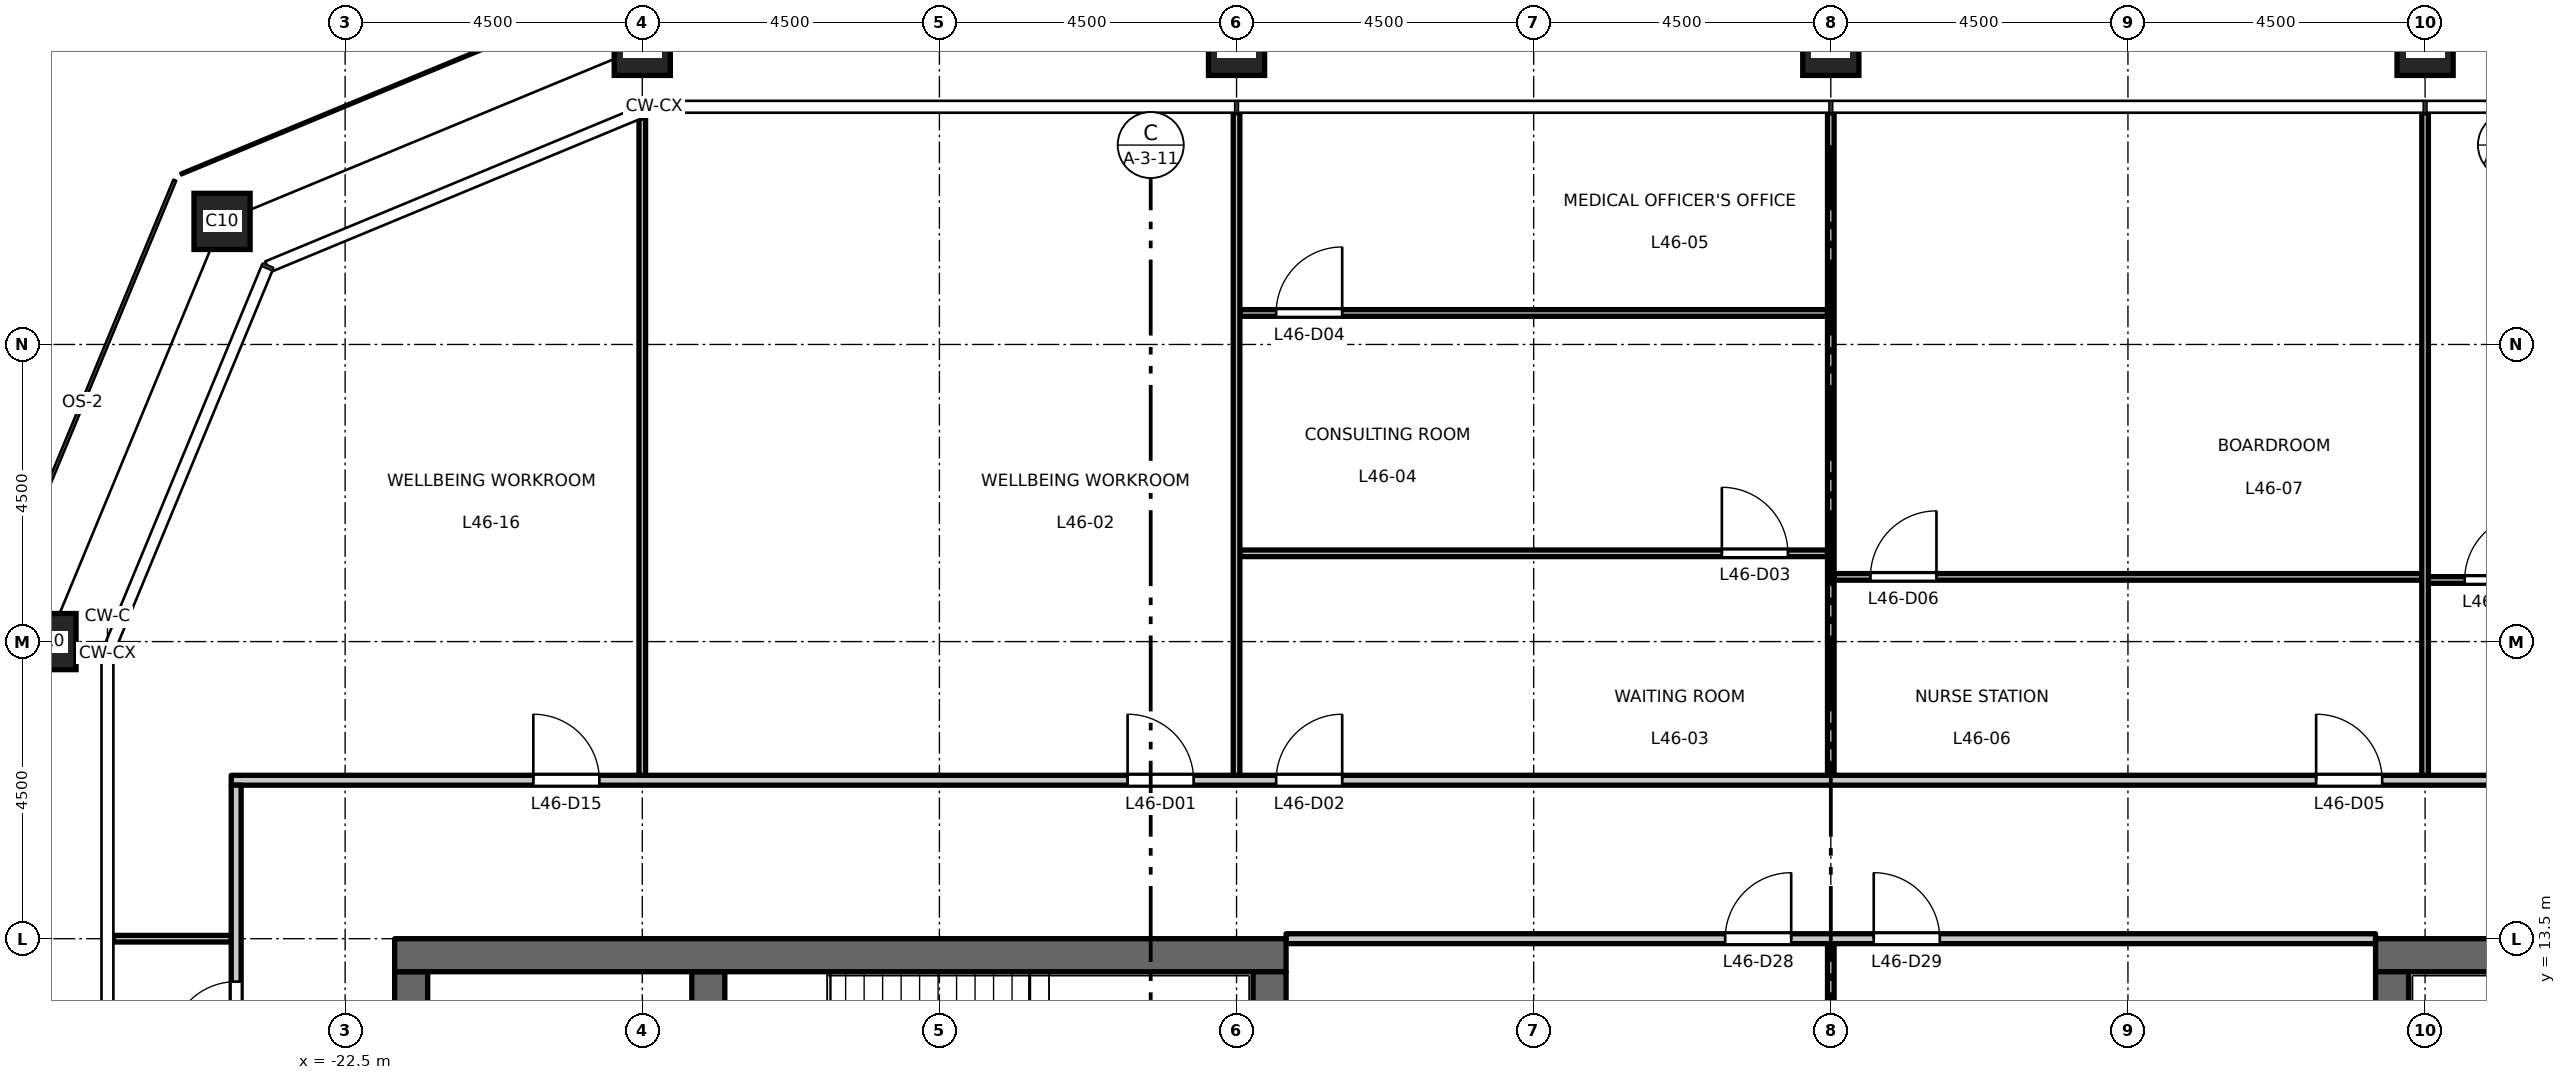
"""IFC4 building model, lengths in metres.
Left out: names, types, materials, properties, quantities, classifications, styles, units other than length and angle.
Written with IfcOpenShell. Run it as: python <this file> out.ifc"""

import sys

from ifc_helpers import new_model, si_unit, direction, frame, frame_2d, origin, origin_2d, place, context, subcontext, project, spatial, rectangle, hollow_rectangle, extrude, element, fill, save


model = new_model("IFC4")
c1 = context("Model", 3, precision=1e-05, world=origin(), true_north=direction((0.0, 1.0)))
c2 = subcontext(c1, "Body", "Model", "MODEL_VIEW")
j1 = project(units=[si_unit("LENGTHUNIT", "METRE"), si_unit("PLANEANGLEUNIT", "RADIAN")], contexts=[c1])
p1 = place(None, origin())
s1 = spatial("IfcSite", under=j1, at=p1, CompositionType="ELEMENT")
p2 = place(p1, origin())
s2 = spatial("IfcBuilding", under=s1, at=p2, CompositionType="ELEMENT")
p3 = place(p2, frame((0.0, 0.0, 215.2)))
s3 = spatial("IfcBuildingStorey", under=s2, at=p3, CompositionType="ELEMENT", Elevation=215.2)
for number, where, z_axis, x_axis in (
    (1, (9.0, 27.0, 0.0), (0.0, 0.0, 1.0), (1.0, 0.0, 0.0)),
    (2, (0.0, 27.0, 0.0), (0.0, 0.0, 1.0), (1.0, 0.0, 0.0)),
    (3, (-9.0, 27.0, 0.0), (0.0, 0.0, 1.0), (1.0, 0.0, 0.0)),
    (4, (-18.0, 27.0, 0.0), (0.0, 0.0, 1.0), (1.0, 0.0, 0.0)),
    (5, (-24.364, 24.364, 0.0), (0.0, 0.0, 1.0), (1.0, 0.0, 0.0)),
    (6, (-27.0, 18.0, 0.0), (0.0, 0.0, 1.0), (1.0, 0.0, 0.0)),
):
    element("IfcColumn", number, at=place(p3, frame(where, z_axis=z_axis, x_axis=x_axis)), inside=s3, PredefinedType="COLUMN", context=c2, shape_type="SweptSolid", body=[
        extrude(hollow_rectangle(XDim=0.85, YDim=0.85, WallThickness=0.05, at=origin_2d()), origin(), (0.0, 0.0, 1.0), 4.5),
    ])
p4 = place(p3, frame((-21.5, -13.0, 0.0), z_axis=(0.0, 0.0, 1.0), x_axis=(0.0, 1.0, 0.0)))
e7 = element("IfcWall", 7, at=p4, inside=s3, PredefinedType="SHEAR", context=c2, shape_type="SweptSolid", body=[
    extrude(rectangle(XDim=26.0, YDim=0.5, at=frame_2d((13.0, 0.0))), origin(), (0.0, 0.0, 1.0), 4.35),
])
p5 = place(p4, frame((16.825, 0.0, 0.0)))
e8 = element("IfcOpeningElement", 8, at=p5, cuts=e7, PredefinedType="OPENING", context=c2, shape_type="SweptSolid", body=[
    extrude(rectangle(XDim=1.8, YDim=2.1, at=frame_2d((0.9, 1.05))), frame((0.0, 0.26, 0.0), z_axis=(0.0, -1.0, 0.0), x_axis=(1.0, 0.0, 0.0)), (0.0, 0.0, 1.0), 0.52),
])
p6 = place(p4, frame((7.375, 0.0, 0.0)))
e9 = element("IfcOpeningElement", 9, at=p6, cuts=e7, PredefinedType="OPENING", context=c2, shape_type="SweptSolid", body=[
    extrude(rectangle(XDim=1.8, YDim=2.1, at=frame_2d((0.9, 1.05))), frame((0.0, 0.26, 0.0), z_axis=(0.0, -1.0, 0.0), x_axis=(1.0, 0.0, 0.0)), (0.0, 0.0, 1.0), 0.52),
])
p7 = place(p4, frame((14.125, 0.0, 0.0)))
e10 = element("IfcOpeningElement", 10, at=p7, cuts=e7, PredefinedType="OPENING", context=c2, shape_type="SweptSolid", body=[
    extrude(rectangle(XDim=0.9, YDim=2.1, at=frame_2d((0.45, 1.05))), frame((0.0, 0.26, 0.0), z_axis=(0.0, -1.0, 0.0), x_axis=(1.0, 0.0, 0.0)), (0.0, 0.0, 1.0), 0.52),
])
p8 = place(p3, frame((-17.0, 6.425, 0.0), z_axis=(0.0, 0.0, 1.0), x_axis=(0.0, 1.0, 0.0)))
e11 = element("IfcWall", 11, at=p8, inside=s3, PredefinedType="SHEAR", context=c2, shape_type="SweptSolid", body=[
    extrude(rectangle(XDim=6.575, YDim=0.5, at=frame_2d((3.288, 0.0))), origin(), (0.0, 0.0, 1.0), 4.35),
])
p9 = place(p3, frame((-8.25, 13.25, 0.0), z_axis=(0.0, 0.0, 1.0), x_axis=(-1.0, 0.0, 0.0)))
e12 = element("IfcWall", 12, at=p9, inside=s3, PredefinedType="SHEAR", context=c2, shape_type="SweptSolid", body=[
    extrude(rectangle(XDim=13.5, YDim=0.5, at=frame_2d((6.75, 0.0))), origin(), (0.0, 0.0, 1.0), 4.35),
])
p10 = place(p3, frame((-8.5, -13.0, 0.0), z_axis=(0.0, 0.0, 1.0), x_axis=(0.0, 1.0, 0.0)))
e13 = element("IfcWall", 13, at=p10, inside=s3, PredefinedType="SHEAR", context=c2, shape_type="SweptSolid", body=[
    extrude(rectangle(XDim=26.0, YDim=0.5, at=frame_2d((13.0, 0.0))), origin(), (0.0, 0.0, 1.0), 4.35),
])
p11 = place(p3, frame((8.25, 13.25, 0.0), z_axis=(0.0, 0.0, 1.0), x_axis=(1.0, 0.0, 0.0)))
e14 = element("IfcWall", 14, at=p11, inside=s3, PredefinedType="SHEAR", context=c2, shape_type="SweptSolid", body=[
    extrude(rectangle(XDim=13.5, YDim=0.5, at=frame_2d((6.75, 0.0))), origin(), (0.0, 0.0, 1.0), 4.35),
])
p12 = place(p3, frame((8.5, -13.0, 0.0), z_axis=(0.0, 0.0, 1.0), x_axis=(0.0, 1.0, 0.0)))
e15 = element("IfcWall", 15, at=p12, inside=s3, PredefinedType="SHEAR", context=c2, shape_type="SweptSolid", body=[
    extrude(rectangle(XDim=26.0, YDim=0.5, at=frame_2d((13.0, 0.0))), origin(), (0.0, 0.0, 1.0), 4.35),
])
p13 = place(p3, frame((-26.01, 13.5, 0.0), z_axis=(0.0, 0.0, 1.0), x_axis=(1.0, 0.0, 0.0)))
e16 = element("IfcWall", 16, at=p13, inside=s3, PredefinedType="PARTITIONING", context=c2, shape_type="SweptSolid", body=[
    extrude(rectangle(XDim=1.785, YDim=0.1, at=frame_2d((0.893, 0.0))), origin(), (0.0, 0.0, 1.0), 4.35),
])
p14 = place(p3, frame((-8.25, 13.5, 0.0), z_axis=(0.0, 0.0, 1.0), x_axis=(1.0, 0.0, 0.0)))
e17 = element("IfcWall", 17, at=p14, inside=s3, PredefinedType="PARTITIONING", context=c2, shape_type="SweptSolid", body=[
    extrude(rectangle(XDim=16.5, YDim=0.15, at=frame_2d((8.25, 0.0))), origin(), (0.0, 0.0, 1.0), 4.35),
])
p15 = place(p14, frame((6.65, 0.0, 0.0)))
e18 = element("IfcOpeningElement", 18, at=p15, cuts=e17, PredefinedType="OPENING", context=c2, shape_type="SweptSolid", body=[
    extrude(rectangle(XDim=1.0, YDim=2.1, at=frame_2d((0.5, 1.05))), frame((0.0, 0.085, 0.0), z_axis=(0.0, -1.0, 0.0), x_axis=(1.0, 0.0, 0.0)), (0.0, 0.0, 1.0), 0.17),
])
p16 = place(p14, frame((8.9, 0.0, 0.0)))
e19 = element("IfcOpeningElement", 19, at=p16, cuts=e17, PredefinedType="OPENING", context=c2, shape_type="SweptSolid", body=[
    extrude(rectangle(XDim=1.0, YDim=2.1, at=frame_2d((0.5, 1.05))), frame((0.0, 0.085, 0.0), z_axis=(0.0, -1.0, 0.0), x_axis=(1.0, 0.0, 0.0)), (0.0, 0.0, 1.0), 0.17),
])
p17 = place(p3, frame((-24.225, 15.9, 0.0), z_axis=(0.0, 0.0, 1.0), x_axis=(1.0, 0.0, 0.0)))
e20 = element("IfcWall", 20, at=p17, inside=s3, PredefinedType="PARTITIONING", context=c2, shape_type="SweptSolid", body=[
    extrude(rectangle(XDim=48.45, YDim=0.15, at=frame_2d((24.225, 0.0))), origin(), (0.0, 0.0, 1.0), 4.35),
])
p18 = place(p17, frame((13.575, 0.0, 0.0)))
e21 = element("IfcOpeningElement", 21, at=p18, cuts=e20, PredefinedType="OPENING", context=c2, shape_type="SweptSolid", body=[
    extrude(rectangle(XDim=1.0, YDim=2.1, at=frame_2d((0.5, 1.05))), frame((0.0, 0.085, 0.0), z_axis=(0.0, -1.0, 0.0), x_axis=(1.0, 0.0, 0.0)), (0.0, 0.0, 1.0), 0.17),
])
p19 = place(p17, frame((15.825, 0.0, 0.0)))
e22 = element("IfcOpeningElement", 22, at=p19, cuts=e20, PredefinedType="OPENING", context=c2, shape_type="SweptSolid", body=[
    extrude(rectangle(XDim=1.0, YDim=2.1, at=frame_2d((0.5, 1.05))), frame((0.0, 0.085, 0.0), z_axis=(0.0, -1.0, 0.0), x_axis=(1.0, 0.0, 0.0)), (0.0, 0.0, 1.0), 0.17),
])
p20 = place(p17, frame((31.575, 0.0, 0.0)))
e23 = element("IfcOpeningElement", 23, at=p20, cuts=e20, PredefinedType="OPENING", context=c2, shape_type="SweptSolid", body=[
    extrude(rectangle(XDim=1.0, YDim=2.1, at=frame_2d((0.5, 1.05))), frame((0.0, 0.085, 0.0), z_axis=(0.0, -1.0, 0.0), x_axis=(1.0, 0.0, 0.0)), (0.0, 0.0, 1.0), 0.17),
])
p21 = place(p17, frame((40.575, 0.0, 0.0)))
e24 = element("IfcOpeningElement", 24, at=p21, cuts=e20, PredefinedType="OPENING", context=c2, shape_type="SweptSolid", body=[
    extrude(rectangle(XDim=1.0, YDim=2.1, at=frame_2d((0.5, 1.05))), frame((0.0, 0.085, 0.0), z_axis=(0.0, -1.0, 0.0), x_axis=(1.0, 0.0, 0.0)), (0.0, 0.0, 1.0), 0.17),
])
p22 = place(p17, frame((4.575, 0.0, 0.0)))
e25 = element("IfcOpeningElement", 25, at=p22, cuts=e20, PredefinedType="OPENING", context=c2, shape_type="SweptSolid", body=[
    extrude(rectangle(XDim=1.0, YDim=2.1, at=frame_2d((0.5, 1.05))), frame((0.0, 0.085, 0.0), z_axis=(0.0, -1.0, 0.0), x_axis=(1.0, 0.0, 0.0)), (0.0, 0.0, 1.0), 0.17),
])
p23 = place(p3, frame((9.05, 18.933, 0.0), z_axis=(0.0, 0.0, 1.0), x_axis=(1.0, 0.0, 0.0)))
e26 = element("IfcWall", 26, at=p23, inside=s3, PredefinedType="PARTITIONING", context=c2, shape_type="SweptSolid", body=[
    extrude(rectangle(XDim=8.9, YDim=0.1, at=frame_2d((4.45, 0.0))), origin(), (0.0, 0.0, 1.0), 4.35),
])
p24 = place(p23, frame((0.55, 0.0, 0.0)))
e27 = element("IfcOpeningElement", 27, at=p24, cuts=e26, PredefinedType="OPENING", context=c2, shape_type="SweptSolid", body=[
    extrude(rectangle(XDim=1.0, YDim=2.1, at=frame_2d((0.5, 1.05))), frame((0.0, 0.06, 0.0), z_axis=(0.0, -1.0, 0.0), x_axis=(1.0, 0.0, 0.0)), (0.0, 0.0, 1.0), 0.12),
])
p25 = place(p3, frame((0.05, 18.98, 0.0), z_axis=(0.0, 0.0, 1.0), x_axis=(1.0, 0.0, 0.0)))
e28 = element("IfcWall", 28, at=p25, inside=s3, PredefinedType="PARTITIONING", context=c2, shape_type="SweptSolid", body=[
    extrude(rectangle(XDim=8.9, YDim=0.1, at=frame_2d((4.45, 0.0))), origin(), (0.0, 0.0, 1.0), 4.35),
])
p26 = place(p25, frame((0.55, 0.0, 0.0)))
e29 = element("IfcOpeningElement", 29, at=p26, cuts=e28, PredefinedType="OPENING", context=c2, shape_type="SweptSolid", body=[
    extrude(rectangle(XDim=1.0, YDim=2.1, at=frame_2d((0.5, 1.05))), frame((0.0, 0.06, 0.0), z_axis=(0.0, -1.0, 0.0), x_axis=(1.0, 0.0, 0.0)), (0.0, 0.0, 1.0), 0.12),
])
p27 = place(p3, frame((-8.95, 19.337, 0.0), z_axis=(0.0, 0.0, 1.0), x_axis=(1.0, 0.0, 0.0)))
e30 = element("IfcWall", 30, at=p27, inside=s3, PredefinedType="PARTITIONING", context=c2, shape_type="SweptSolid", body=[
    extrude(rectangle(XDim=8.9, YDim=0.1, at=frame_2d((4.45, 0.0))), origin(), (0.0, 0.0, 1.0), 4.35),
])
p28 = place(p27, frame((7.3, 0.0, 0.0)))
e31 = element("IfcOpeningElement", 31, at=p28, cuts=e30, PredefinedType="OPENING", context=c2, shape_type="SweptSolid", body=[
    extrude(rectangle(XDim=1.0, YDim=2.1, at=frame_2d((0.5, 1.05))), frame((0.0, 0.06, 0.0), z_axis=(0.0, -1.0, 0.0), x_axis=(1.0, 0.0, 0.0)), (0.0, 0.0, 1.0), 0.12),
])
p29 = place(p3, frame((-8.95, 22.977, 0.0), z_axis=(0.0, 0.0, 1.0), x_axis=(1.0, 0.0, 0.0)))
e32 = element("IfcWall", 32, at=p29, inside=s3, PredefinedType="PARTITIONING", context=c2, shape_type="SweptSolid", body=[
    extrude(rectangle(XDim=8.9, YDim=0.1, at=frame_2d((4.45, 0.0))), origin(), (0.0, 0.0, 1.0), 4.35),
])
p30 = place(p29, frame((0.55, 0.0, 0.0)))
e33 = element("IfcOpeningElement", 33, at=p30, cuts=e32, PredefinedType="OPENING", context=c2, shape_type="SweptSolid", body=[
    extrude(rectangle(XDim=1.0, YDim=2.1, at=frame_2d((0.5, 1.05))), frame((0.0, 0.06, 0.0), z_axis=(0.0, -1.0, 0.0), x_axis=(1.0, 0.0, 0.0)), (0.0, 0.0, 1.0), 0.12),
])
p31 = place(p3, frame((-24.15, -15.825, 0.0), z_axis=(0.0, 0.0, 1.0), x_axis=(0.0, 1.0, 0.0)))
e34 = element("IfcWall", 34, at=p31, inside=s3, PredefinedType="PARTITIONING", context=c2, shape_type="SweptSolid", body=[
    extrude(rectangle(XDim=31.65, YDim=0.15, at=frame_2d((15.825, 0.0))), origin(), (0.0, 0.0, 1.0), 4.35),
])
p32 = place(p31, frame((2.925, 0.0, 0.0)))
e35 = element("IfcOpeningElement", 35, at=p32, cuts=e34, PredefinedType="OPENING", context=c2, shape_type="SweptSolid", body=[
    extrude(rectangle(XDim=1.0, YDim=2.1, at=frame_2d((0.5, 1.05))), frame((0.0, 0.085, 0.0), z_axis=(0.0, -1.0, 0.0), x_axis=(1.0, 0.0, 0.0)), (0.0, 0.0, 1.0), 0.17),
])
p33 = place(p31, frame((14.175, 0.0, 0.0)))
e36 = element("IfcOpeningElement", 36, at=p33, cuts=e34, PredefinedType="OPENING", context=c2, shape_type="SweptSolid", body=[
    extrude(rectangle(XDim=1.0, YDim=2.1, at=frame_2d((0.5, 1.05))), frame((0.0, 0.085, 0.0), z_axis=(0.0, -1.0, 0.0), x_axis=(1.0, 0.0, 0.0)), (0.0, 0.0, 1.0), 0.17),
])
p34 = place(p31, frame((16.425, 0.0, 0.0)))
e37 = element("IfcOpeningElement", 37, at=p34, cuts=e34, PredefinedType="OPENING", context=c2, shape_type="SweptSolid", body=[
    extrude(rectangle(XDim=1.0, YDim=2.1, at=frame_2d((0.5, 1.05))), frame((0.0, 0.085, 0.0), z_axis=(0.0, -1.0, 0.0), x_axis=(1.0, 0.0, 0.0)), (0.0, 0.0, 1.0), 0.17),
])
p35 = place(p31, frame((27.675, 0.0, 0.0)))
e38 = element("IfcOpeningElement", 38, at=p35, cuts=e34, PredefinedType="OPENING", context=c2, shape_type="SweptSolid", body=[
    extrude(rectangle(XDim=1.0, YDim=2.1, at=frame_2d((0.5, 1.05))), frame((0.0, 0.085, 0.0), z_axis=(0.0, -1.0, 0.0), x_axis=(1.0, 0.0, 0.0)), (0.0, 0.0, 1.0), 0.17),
])
p36 = place(p3, frame((-18.0, 15.975, 0.0), z_axis=(0.0, 0.0, 1.0), x_axis=(0.0, 1.0, 0.0)))
e39 = element("IfcWall", 39, at=p36, inside=s3, PredefinedType="PARTITIONING", context=c2, shape_type="SweptSolid", body=[
    extrude(rectangle(XDim=9.953, YDim=0.1, at=frame_2d((4.977, 0.0))), origin(), (0.0, 0.0, 1.0), 3.65),
])
p37 = place(p3, frame((-9.0, 15.975, 0.0), z_axis=(0.0, 0.0, 1.0), x_axis=(0.0, 1.0, 0.0)))
e40 = element("IfcWall", 40, at=p37, inside=s3, PredefinedType="PARTITIONING", context=c2, shape_type="SweptSolid", body=[
    extrude(rectangle(XDim=10.035, YDim=0.1, at=frame_2d((5.018, 0.0))), origin(), (0.0, 0.0, 1.0), 3.65),
])
p38 = place(p3, frame((0.0, 8.6, 0.0), z_axis=(0.0, 0.0, 1.0), x_axis=(0.0, 1.0, 0.0)))
e41 = element("IfcWall", 41, at=p38, inside=s3, PredefinedType="PARTITIONING", context=c2, shape_type="SweptSolid", body=[
    extrude(rectangle(XDim=4.825, YDim=0.1, at=frame_2d((2.413, 0.0))), origin(), (0.0, 0.0, 1.0), 3.55),
])
p39 = place(p3, frame((0.0, 15.975, 0.0), z_axis=(0.0, 0.0, 1.0), x_axis=(0.0, 1.0, 0.0)))
e42 = element("IfcWall", 42, at=p39, inside=s3, PredefinedType="PARTITIONING", context=c2, shape_type="SweptSolid", body=[
    extrude(rectangle(XDim=10.035, YDim=0.1, at=frame_2d((5.018, 0.0))), origin(), (0.0, 0.0, 1.0), 3.55),
])
p40 = place(p3, frame((9.0, 15.975, 0.0), z_axis=(0.0, 0.0, 1.0), x_axis=(0.0, 1.0, 0.0)))
e43 = element("IfcWall", 43, at=p40, inside=s3, PredefinedType="PARTITIONING", context=c2, shape_type="SweptSolid", body=[
    extrude(rectangle(XDim=10.035, YDim=0.1, at=frame_2d((5.018, 0.0))), origin(), (0.0, 0.0, 1.0), 3.65),
])
p41 = place(p18, origin())
e44 = element("IfcDoor", 44, at=p41, inside=s3, OperationType="SINGLE_SWING_LEFT", PredefinedType="DOOR", context=c2, shape_type="SweptSolid", body=[
    extrude(rectangle(XDim=1.0, YDim=2.1, at=frame_2d((0.5, 1.05))), frame((0.0, 0.025, 0.0), z_axis=(0.0, -1.0, 0.0), x_axis=(1.0, 0.0, 0.0)), (0.0, 0.0, 1.0), 0.05),
])
fill(e21, e44)
p42 = place(p19, origin())
e45 = element("IfcDoor", 45, at=p42, inside=s3, OperationType="SINGLE_SWING_RIGHT", PredefinedType="DOOR", context=c2, shape_type="SweptSolid", body=[
    extrude(rectangle(XDim=1.0, YDim=2.1, at=frame_2d((0.5, 1.05))), frame((0.0, 0.025, 0.0), z_axis=(0.0, -1.0, 0.0), x_axis=(1.0, 0.0, 0.0)), (0.0, 0.0, 1.0), 0.05),
])
fill(e22, e45)
p43 = place(p28, origin())
e46 = element("IfcDoor", 46, at=p43, inside=s3, OperationType="SINGLE_SWING_LEFT", PredefinedType="DOOR", context=c2, shape_type="SweptSolid", body=[
    extrude(rectangle(XDim=1.0, YDim=2.1, at=frame_2d((0.5, 1.05))), frame((0.0, 0.025, 0.0), z_axis=(0.0, -1.0, 0.0), x_axis=(1.0, 0.0, 0.0)), (0.0, 0.0, 1.0), 0.05),
])
fill(e31, e46)
p44 = place(p30, origin())
e47 = element("IfcDoor", 47, at=p44, inside=s3, OperationType="SINGLE_SWING_RIGHT", PredefinedType="DOOR", context=c2, shape_type="SweptSolid", body=[
    extrude(rectangle(XDim=1.0, YDim=2.1, at=frame_2d((0.5, 1.05))), frame((0.0, 0.025, 0.0), z_axis=(0.0, -1.0, 0.0), x_axis=(1.0, 0.0, 0.0)), (0.0, 0.0, 1.0), 0.05),
])
fill(e33, e47)
p45 = place(p20, origin())
e48 = element("IfcDoor", 48, at=p45, inside=s3, OperationType="SINGLE_SWING_LEFT", PredefinedType="DOOR", context=c2, shape_type="SweptSolid", body=[
    extrude(rectangle(XDim=1.0, YDim=2.1, at=frame_2d((0.5, 1.05))), frame((0.0, 0.025, 0.0), z_axis=(0.0, -1.0, 0.0), x_axis=(1.0, 0.0, 0.0)), (0.0, 0.0, 1.0), 0.05),
])
fill(e23, e48)
p46 = place(p26, origin())
e49 = element("IfcDoor", 49, at=p46, inside=s3, OperationType="SINGLE_SWING_RIGHT", PredefinedType="DOOR", context=c2, shape_type="SweptSolid", body=[
    extrude(rectangle(XDim=1.0, YDim=2.1, at=frame_2d((0.5, 1.05))), frame((0.0, 0.025, 0.0), z_axis=(0.0, -1.0, 0.0), x_axis=(1.0, 0.0, 0.0)), (0.0, 0.0, 1.0), 0.05),
])
fill(e29, e49)
p47 = place(p24, origin())
e50 = element("IfcDoor", 50, at=p47, inside=s3, OperationType="SINGLE_SWING_RIGHT", PredefinedType="DOOR", context=c2, shape_type="SweptSolid", body=[
    extrude(rectangle(XDim=1.0, YDim=2.1, at=frame_2d((0.5, 1.05))), frame((0.0, 0.025, 0.0), z_axis=(0.0, -1.0, 0.0), x_axis=(1.0, 0.0, 0.0)), (0.0, 0.0, 1.0), 0.05),
])
fill(e27, e50)
p48 = place(p22, origin())
e51 = element("IfcDoor", 51, at=p48, inside=s3, OperationType="SINGLE_SWING_LEFT", PredefinedType="DOOR", context=c2, shape_type="SweptSolid", body=[
    extrude(rectangle(XDim=1.0, YDim=2.1, at=frame_2d((0.5, 1.05))), frame((0.0, 0.025, 0.0), z_axis=(0.0, -1.0, 0.0), x_axis=(1.0, 0.0, 0.0)), (0.0, 0.0, 1.0), 0.05),
])
fill(e25, e51)
p49 = place(p35, origin())
e52 = element("IfcDoor", 52, at=p49, inside=s3, OperationType="SINGLE_SWING_LEFT", PredefinedType="DOOR", context=c2, shape_type="SweptSolid", body=[
    extrude(rectangle(XDim=1.0, YDim=2.1, at=frame_2d((0.5, 1.05))), frame((0.0, 0.025, 0.0), z_axis=(0.0, -1.0, 0.0), x_axis=(1.0, 0.0, 0.0)), (0.0, 0.0, 1.0), 0.05),
])
fill(e38, e52)
p50 = place(p15, origin())
e53 = element("IfcDoor", 53, at=p50, inside=s3, OperationType="SINGLE_SWING_RIGHT", PredefinedType="DOOR", context=c2, shape_type="SweptSolid", body=[
    extrude(rectangle(XDim=1.0, YDim=2.1, at=frame_2d((0.5, 1.05))), frame((0.0, 0.025, 0.0), z_axis=(0.0, -1.0, 0.0), x_axis=(1.0, 0.0, 0.0)), (0.0, 0.0, 1.0), 0.05),
])
fill(e18, e53)
p51 = place(p16, origin())
e54 = element("IfcDoor", 54, at=p51, inside=s3, OperationType="SINGLE_SWING_LEFT", PredefinedType="DOOR", context=c2, shape_type="SweptSolid", body=[
    extrude(rectangle(XDim=1.0, YDim=2.1, at=frame_2d((0.5, 1.05))), frame((0.0, 0.025, 0.0), z_axis=(0.0, -1.0, 0.0), x_axis=(1.0, 0.0, 0.0)), (0.0, 0.0, 1.0), 0.05),
])
fill(e19, e54)
save(model, sys.argv[1])
